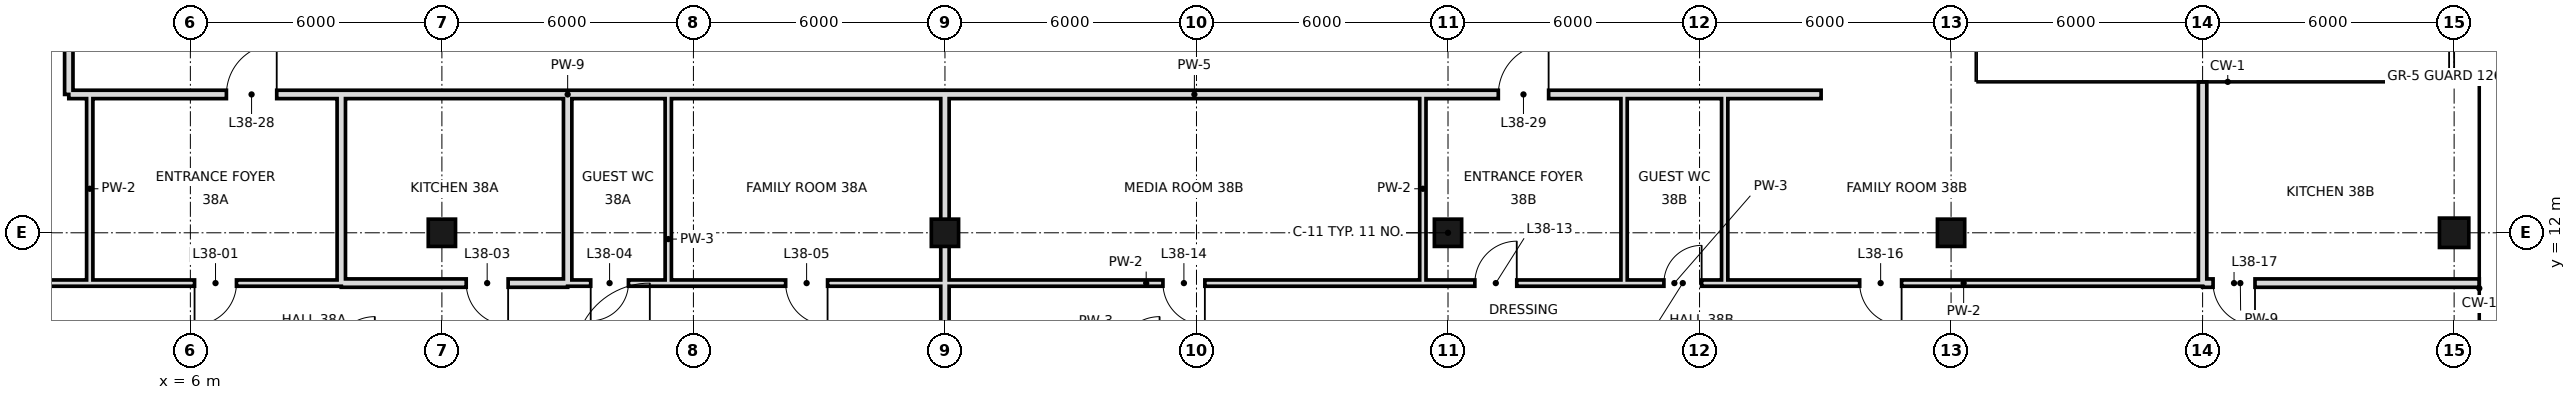
"""IFC4 building model, lengths in metres.
Left out: names, types, materials, properties, quantities, classifications, styles, units other than length and angle.
Written with IfcOpenShell. Run it as: python <this file> out.ifc"""

import sys

from ifc_helpers import new_model, si_unit, direction, frame, frame_2d, origin, origin_2d, place, context, subcontext, project, spatial, rectangle, hollow_rectangle, extrude, element, fill, save


model = new_model("IFC4")
c1 = context("Model", 3, precision=1e-05, world=origin(), true_north=direction((0.0, 1.0)))
c2 = subcontext(c1, "Body", "Model", "MODEL_VIEW")
j1 = project(units=[si_unit("LENGTHUNIT", "METRE"), si_unit("PLANEANGLEUNIT", "RADIAN")], contexts=[c1])
p1 = place(None, origin())
s1 = spatial("IfcSite", under=j1, at=p1, CompositionType="ELEMENT")
p2 = place(p1, origin())
s2 = spatial("IfcBuilding", under=s1, at=p2, CompositionType="ELEMENT")
p3 = place(p2, frame((0.0, 0.0, 167.2)))
s3 = spatial("IfcBuildingStorey", under=s2, at=p3, CompositionType="ELEMENT", Elevation=167.2)
for number, where, z_axis, x_axis in (
    (1, (12.0, 12.0, 0.0), (0.0, 0.0, 1.0), (1.0, 0.0, 0.0)),
    (2, (24.0, 12.0, 0.0), (0.0, 0.0, 1.0), (1.0, 0.0, 0.0)),
    (3, (36.0, 12.0, 0.0), (0.0, 0.0, 1.0), (1.0, 0.0, 0.0)),
    (4, (48.0, 12.0, 0.0), (0.0, 0.0, 1.0), (1.0, 0.0, 0.0)),
):
    element("IfcColumn", number, at=place(p3, frame(where, z_axis=z_axis, x_axis=x_axis)), inside=s3, PredefinedType="COLUMN", context=c2, shape_type="SweptSolid", body=[
        extrude(hollow_rectangle(XDim=0.65, YDim=0.65, WallThickness=0.032, at=origin_2d()), origin(), (0.0, 0.0, 1.0), 3.6),
    ])
p4 = place(p3, frame((60.0, 12.0, 0.0), z_axis=(0.0, 0.0, 1.0), x_axis=(1.0, 0.0, 0.0)))
e5 = element("IfcColumn", 5, at=p4, inside=s3, PredefinedType="COLUMN", context=c2, shape_type="SweptSolid", body=[
    extrude(hollow_rectangle(XDim=0.7, YDim=0.7, WallThickness=0.036, at=origin_2d()), origin(), (0.0, 0.0, 1.0), 3.6),
])
p5 = place(p3, frame((15.0, 10.8, 0.0), z_axis=(0.0, 0.0, 1.0), x_axis=(0.0, 1.0, 0.0)))
e6 = element("IfcWall", 6, at=p5, inside=s3, PredefinedType="SOLIDWALL", context=c2, shape_type="SweptSolid", body=[
    extrude(rectangle(XDim=4.5, YDim=0.2, at=frame_2d((2.25, 0.0))), origin(), (0.0, 0.0, 1.0), 2.72),
])
p6 = place(p3, frame((17.4, 10.8, 0.0), z_axis=(0.0, 0.0, 1.0), x_axis=(0.0, 1.0, 0.0)))
e7 = element("IfcWall", 7, at=p6, inside=s3, PredefinedType="PARTITIONING", context=c2, shape_type="SweptSolid", body=[
    extrude(rectangle(XDim=4.5, YDim=0.15, at=frame_2d((2.25, 0.0))), origin(), (0.0, 0.0, 1.0), 3.42),
])
p7 = place(p3, frame((24.0, 0.0, 0.0), z_axis=(0.0, 0.0, 1.0), x_axis=(0.0, 1.0, 0.0)))
e8 = element("IfcWall", 8, at=p7, inside=s3, PredefinedType="SOLIDWALL", context=c2, shape_type="SweptSolid", body=[
    extrude(rectangle(XDim=15.3, YDim=0.2, at=frame_2d((7.65, 0.0))), origin(), (0.0, 0.0, 1.0), 2.72),
])
p8 = place(p3, frame((3.1, 15.3, 0.0), z_axis=(0.0, 0.0, 1.0), x_axis=(0.0, 1.0, 0.0)))
e9 = element("IfcWall", 9, at=p8, inside=s3, PredefinedType="SOLIDWALL", context=c2, shape_type="SweptSolid", body=[
    extrude(rectangle(XDim=33.3, YDim=0.2, at=frame_2d((16.65, 0.0))), origin(), (0.0, 0.0, 1.0), 2.72),
])
p9 = place(p8, frame((22.76, 0.0, 0.0)))
e10 = element("IfcOpeningElement", 10, at=p9, cuts=e9, PredefinedType="OPENING", context=c2, shape_type="SweptSolid", body=[
    extrude(rectangle(XDim=1.2, YDim=2.4, at=frame_2d((0.6, 1.2))), frame((0.0, 0.11, 0.0), z_axis=(0.0, -1.0, 0.0), x_axis=(1.0, 0.0, 0.0)), (0.0, 0.0, 1.0), 0.22),
])
for number, where, z_axis, x_axis in (
    (11, (3.6, 10.8, 0.0), (0.0, 0.0, 1.0), (0.0, 1.0, 0.0)),
    (12, (35.4, 10.8, 0.0), (0.0, 0.0, 1.0), (0.0, 1.0, 0.0)),
    (13, (40.2, 10.8, 0.0), (0.0, 0.0, 1.0), (0.0, 1.0, 0.0)),
    (14, (42.6, 10.8, 0.0), (0.0, 0.0, 1.0), (0.0, 1.0, 0.0)),
):
    element("IfcWall", number, at=place(p3, frame(where, z_axis=z_axis, x_axis=x_axis)), inside=s3, PredefinedType="PARTITIONING", context=c2, shape_type="SweptSolid", body=[
        extrude(rectangle(XDim=4.5, YDim=0.15, at=frame_2d((2.25, 0.0))), origin(), (0.0, 0.0, 1.0), 3.42),
    ])
p10 = place(p3, frame((54.0, 10.8, 0.0), z_axis=(0.0, 0.0, 1.0), x_axis=(0.0, 1.0, 0.0)))
e15 = element("IfcWall", 15, at=p10, inside=s3, PredefinedType="SOLIDWALL", context=c2, shape_type="SweptSolid", body=[
    extrude(rectangle(XDim=4.8, YDim=0.2, at=frame_2d((2.4, 0.0))), origin(), (0.0, 0.0, 1.0), 2.72),
])
p11 = place(p3, frame((9.6, 10.8, 0.0), z_axis=(0.0, 0.0, 1.0), x_axis=(0.0, 1.0, 0.0)))
e16 = element("IfcWall", 16, at=p11, inside=s3, PredefinedType="SOLIDWALL", context=c2, shape_type="SweptSolid", body=[
    extrude(rectangle(XDim=4.5, YDim=0.2, at=frame_2d((2.25, 0.0))), origin(), (0.0, 0.0, 1.0), 2.72),
])
p12 = place(p3, frame((9.6, 10.8, 0.0), z_axis=(0.0, 0.0, 1.0), x_axis=(1.0, 0.0, 0.0)))
e17 = element("IfcWall", 17, at=p12, inside=s3, PredefinedType="SOLIDWALL", context=c2, shape_type="SweptSolid", body=[
    extrude(rectangle(XDim=5.4, YDim=0.2, at=frame_2d((2.7, 0.0))), origin(), (0.0, 0.0, 1.0), 2.72),
])
p13 = place(p12, frame((2.98, 0.0, 0.0)))
e18 = element("IfcOpeningElement", 18, at=p13, cuts=e17, PredefinedType="OPENING", context=c2, shape_type="SweptSolid", body=[
    extrude(rectangle(XDim=1.0, YDim=2.4, at=frame_2d((0.5, 1.2))), frame((0.0, 0.11, 0.0), z_axis=(0.0, -1.0, 0.0), x_axis=(1.0, 0.0, 0.0)), (0.0, 0.0, 1.0), 0.22),
])
p14 = place(p3, frame((54.0, 10.8, 0.0), z_axis=(0.0, 0.0, 1.0), x_axis=(1.0, 0.0, 0.0)))
e19 = element("IfcWall", 19, at=p14, inside=s3, PredefinedType="SOLIDWALL", context=c2, shape_type="SweptSolid", body=[
    extrude(rectangle(XDim=6.6, YDim=0.2, at=frame_2d((3.3, 0.0))), origin(), (0.0, 0.0, 1.0), 2.97),
])
p15 = place(p14, frame((0.25, 0.0, 0.0)))
e20 = element("IfcOpeningElement", 20, at=p15, cuts=e19, PredefinedType="OPENING", context=c2, shape_type="SweptSolid", body=[
    extrude(rectangle(XDim=1.0, YDim=2.4, at=frame_2d((0.5, 1.2))), frame((0.0, 0.11, 0.0), z_axis=(0.0, -1.0, 0.0), x_axis=(1.0, 0.0, 0.0)), (0.0, 0.0, 1.0), 0.22),
])
p16 = place(p3, frame((-6.6, 10.8, 0.0), z_axis=(0.0, 0.0, 1.0), x_axis=(1.0, 0.0, 0.0)))
e21 = element("IfcWall", 21, at=p16, inside=s3, PredefinedType="PARTITIONING", context=c2, shape_type="SweptSolid", body=[
    extrude(rectangle(XDim=16.2, YDim=0.15, at=frame_2d((8.1, 0.0))), origin(), (0.0, 0.0, 1.0), 3.42),
])
p17 = place(p16, frame((12.7, 0.0, 0.0)))
e22 = element("IfcOpeningElement", 22, at=p17, cuts=e21, PredefinedType="OPENING", context=c2, shape_type="SweptSolid", body=[
    extrude(rectangle(XDim=1.0, YDim=2.4, at=frame_2d((0.5, 1.2))), frame((0.0, 0.085, 0.0), z_axis=(0.0, -1.0, 0.0), x_axis=(1.0, 0.0, 0.0)), (0.0, 0.0, 1.0), 0.17),
])
p18 = place(p16, frame((3.28, 0.0, 0.0)))
e23 = element("IfcOpeningElement", 23, at=p18, cuts=e21, PredefinedType="OPENING", context=c2, shape_type="SweptSolid", body=[
    extrude(rectangle(XDim=1.0, YDim=2.4, at=frame_2d((0.5, 1.2))), frame((0.0, 0.085, 0.0), z_axis=(0.0, -1.0, 0.0), x_axis=(1.0, 0.0, 0.0)), (0.0, 0.0, 1.0), 0.17),
])
p19 = place(p3, frame((17.4, 10.8, 0.0), z_axis=(0.0, 0.0, 1.0), x_axis=(1.0, 0.0, 0.0)))
e24 = element("IfcWall", 24, at=p19, inside=s3, PredefinedType="PARTITIONING", context=c2, shape_type="SweptSolid", body=[
    extrude(rectangle(XDim=22.8, YDim=0.15, at=frame_2d((11.4, 0.0))), origin(), (0.0, 0.0, 1.0), 3.42),
])
p20 = place(p19, frame((2.8, 0.0, 0.0)))
e25 = element("IfcOpeningElement", 25, at=p20, cuts=e24, PredefinedType="OPENING", context=c2, shape_type="SweptSolid", body=[
    extrude(rectangle(XDim=1.0, YDim=2.4, at=frame_2d((0.5, 1.2))), frame((0.0, 0.085, 0.0), z_axis=(0.0, -1.0, 0.0), x_axis=(1.0, 0.0, 0.0)), (0.0, 0.0, 1.0), 0.17),
])
p21 = place(p19, frame((19.24, 0.0, 0.0)))
e26 = element("IfcOpeningElement", 26, at=p21, cuts=e24, PredefinedType="OPENING", context=c2, shape_type="SweptSolid", body=[
    extrude(rectangle(XDim=1.0, YDim=2.4, at=frame_2d((0.5, 1.2))), frame((0.0, 0.085, 0.0), z_axis=(0.0, -1.0, 0.0), x_axis=(1.0, 0.0, 0.0)), (0.0, 0.0, 1.0), 0.17),
])
p22 = place(p19, frame((11.8, 0.0, 0.0)))
e27 = element("IfcOpeningElement", 27, at=p22, cuts=e24, PredefinedType="OPENING", context=c2, shape_type="SweptSolid", body=[
    extrude(rectangle(XDim=1.0, YDim=2.4, at=frame_2d((0.5, 1.2))), frame((0.0, 0.085, 0.0), z_axis=(0.0, -1.0, 0.0), x_axis=(1.0, 0.0, 0.0)), (0.0, 0.0, 1.0), 0.17),
])
p23 = place(p3, frame((42.6, 10.8, 0.0), z_axis=(0.0, 0.0, 1.0), x_axis=(1.0, 0.0, 0.0)))
e28 = element("IfcWall", 28, at=p23, inside=s3, PredefinedType="PARTITIONING", context=c2, shape_type="SweptSolid", body=[
    extrude(rectangle(XDim=11.4, YDim=0.15, at=frame_2d((5.7, 0.0))), origin(), (0.0, 0.0, 1.0), 3.42),
])
p24 = place(p23, frame((3.22, 0.0, 0.0)))
e29 = element("IfcOpeningElement", 29, at=p24, cuts=e28, PredefinedType="OPENING", context=c2, shape_type="SweptSolid", body=[
    extrude(rectangle(XDim=1.0, YDim=2.4, at=frame_2d((0.5, 1.2))), frame((0.0, 0.085, 0.0), z_axis=(0.0, -1.0, 0.0), x_axis=(1.0, 0.0, 0.0)), (0.0, 0.0, 1.0), 0.17),
])
p25 = place(p3, frame((15.0, 10.8, 0.0), z_axis=(0.0, 0.0, 1.0), x_axis=(1.0, 0.0, 0.0)))
e30 = element("IfcWall", 30, at=p25, inside=s3, PredefinedType="PARTITIONING", context=c2, shape_type="SweptSolid", body=[
    extrude(rectangle(XDim=2.4, YDim=0.15, at=frame_2d((1.2, 0.0))), origin(), (0.0, 0.0, 1.0), 3.42),
])
p26 = place(p25, frame((0.55, 0.0, 0.0)))
e31 = element("IfcOpeningElement", 31, at=p26, cuts=e30, PredefinedType="OPENING", context=c2, shape_type="SweptSolid", body=[
    extrude(rectangle(XDim=0.9, YDim=2.4, at=frame_2d((0.45, 1.2))), frame((0.0, 0.085, 0.0), z_axis=(0.0, -1.0, 0.0), x_axis=(1.0, 0.0, 0.0)), (0.0, 0.0, 1.0), 0.17),
])
p27 = place(p3, frame((40.2, 10.8, 0.0), z_axis=(0.0, 0.0, 1.0), x_axis=(1.0, 0.0, 0.0)))
e32 = element("IfcWall", 32, at=p27, inside=s3, PredefinedType="PARTITIONING", context=c2, shape_type="SweptSolid", body=[
    extrude(rectangle(XDim=2.4, YDim=0.15, at=frame_2d((1.2, 0.0))), origin(), (0.0, 0.0, 1.0), 3.42),
])
p28 = place(p27, frame((0.95, 0.0, 0.0)))
e33 = element("IfcOpeningElement", 33, at=p28, cuts=e32, PredefinedType="OPENING", context=c2, shape_type="SweptSolid", body=[
    extrude(rectangle(XDim=0.9, YDim=2.4, at=frame_2d((0.45, 1.2))), frame((0.0, 0.085, 0.0), z_axis=(0.0, -1.0, 0.0), x_axis=(1.0, 0.0, 0.0)), (0.0, 0.0, 1.0), 0.17),
])
p29 = place(p3, frame((3.1, 15.3, 0.0), z_axis=(0.0, 0.0, 1.0), x_axis=(1.0, 0.0, 0.0)))
e34 = element("IfcWall", 34, at=p29, inside=s3, PredefinedType="SOLIDWALL", context=c2, shape_type="SweptSolid", body=[
    extrude(rectangle(XDim=6.5, YDim=0.2, at=frame_2d((3.25, 0.0))), origin(), (0.0, 0.0, 1.0), 2.72),
])
p30 = place(p29, frame((3.76, 0.0, 0.0)))
e35 = element("IfcOpeningElement", 35, at=p30, cuts=e34, PredefinedType="OPENING", context=c2, shape_type="SweptSolid", body=[
    extrude(rectangle(XDim=1.2, YDim=2.4, at=frame_2d((0.6, 1.2))), frame((0.0, 0.11, 0.0), z_axis=(0.0, -1.0, 0.0), x_axis=(1.0, 0.0, 0.0)), (0.0, 0.0, 1.0), 0.22),
])
p31 = place(p3, frame((15.0, 15.3, 0.0), z_axis=(0.0, 0.0, 1.0), x_axis=(1.0, 0.0, 0.0)))
e36 = element("IfcWall", 36, at=p31, inside=s3, PredefinedType="SOLIDWALL", context=c2, shape_type="SweptSolid", body=[
    extrude(rectangle(XDim=29.9, YDim=0.2, at=frame_2d((14.95, 0.0))), origin(), (0.0, 0.0, 1.0), 2.72),
])
p32 = place(p31, frame((22.2, 0.0, 0.0)))
e37 = element("IfcOpeningElement", 37, at=p32, cuts=e36, PredefinedType="OPENING", context=c2, shape_type="SweptSolid", body=[
    extrude(rectangle(XDim=1.2, YDim=2.4, at=frame_2d((0.6, 1.2))), frame((0.0, 0.11, 0.0), z_axis=(0.0, -1.0, 0.0), x_axis=(1.0, 0.0, 0.0)), (0.0, 0.0, 1.0), 0.22),
])
p33 = place(p3, frame((9.6, 15.3, 0.0), z_axis=(0.0, 0.0, 1.0), x_axis=(1.0, 0.0, 0.0)))
e38 = element("IfcWall", 38, at=p33, inside=s3, PredefinedType="SOLIDWALL", context=c2, shape_type="SweptSolid", body=[
    extrude(rectangle(XDim=5.4, YDim=0.2, at=frame_2d((2.7, 0.0))), origin(), (0.0, 0.0, 1.0), 3.42),
])
p34 = place(p17, frame((1.0, 0.0, 0.0), z_axis=(0.0, 0.0, 1.0), x_axis=(-1.0, 0.0, 0.0)))
e39 = element("IfcDoor", 39, at=p34, inside=s3, OperationType="SINGLE_SWING_RIGHT", PredefinedType="DOOR", context=c2, shape_type="SweptSolid", body=[
    extrude(rectangle(XDim=1.0, YDim=2.4, at=frame_2d((0.5, 1.2))), frame((0.0, 0.025, 0.0), z_axis=(0.0, -1.0, 0.0), x_axis=(1.0, 0.0, 0.0)), (0.0, 0.0, 1.0), 0.05),
])
fill(e22, e39)
p35 = place(p13, origin())
e40 = element("IfcDoor", 40, at=p35, inside=s3, OperationType="SINGLE_SWING_RIGHT", PredefinedType="DOOR", context=c2, shape_type="SweptSolid", body=[
    extrude(rectangle(XDim=1.0, YDim=2.4, at=frame_2d((0.5, 1.2))), frame((0.0, 0.025, 0.0), z_axis=(0.0, -1.0, 0.0), x_axis=(1.0, 0.0, 0.0)), (0.0, 0.0, 1.0), 0.05),
])
fill(e18, e40)
p36 = place(p26, frame((0.9, 0.0, 0.0), z_axis=(0.0, 0.0, 1.0), x_axis=(-1.0, 0.0, 0.0)))
e41 = element("IfcDoor", 41, at=p36, inside=s3, OperationType="SINGLE_SWING_RIGHT", PredefinedType="DOOR", context=c2, shape_type="SweptSolid", body=[
    extrude(rectangle(XDim=0.9, YDim=2.4, at=frame_2d((0.45, 1.2))), frame((0.0, 0.025, 0.0), z_axis=(0.0, -1.0, 0.0), x_axis=(1.0, 0.0, 0.0)), (0.0, 0.0, 1.0), 0.05),
])
fill(e31, e41)
p37 = place(p20, origin())
e42 = element("IfcDoor", 42, at=p37, inside=s3, OperationType="SINGLE_SWING_RIGHT", PredefinedType="DOOR", context=c2, shape_type="SweptSolid", body=[
    extrude(rectangle(XDim=1.0, YDim=2.4, at=frame_2d((0.5, 1.2))), frame((0.0, 0.025, 0.0), z_axis=(0.0, -1.0, 0.0), x_axis=(1.0, 0.0, 0.0)), (0.0, 0.0, 1.0), 0.05),
])
fill(e25, e42)
p38 = place(p21, frame((1.0, 0.0, 0.0), z_axis=(0.0, 0.0, 1.0), x_axis=(-1.0, 0.0, 0.0)))
e43 = element("IfcDoor", 43, at=p38, inside=s3, OperationType="SINGLE_SWING_LEFT", PredefinedType="DOOR", context=c2, shape_type="SweptSolid", body=[
    extrude(rectangle(XDim=1.0, YDim=2.4, at=frame_2d((0.5, 1.2))), frame((0.0, 0.025, 0.0), z_axis=(0.0, -1.0, 0.0), x_axis=(1.0, 0.0, 0.0)), (0.0, 0.0, 1.0), 0.05),
])
fill(e26, e43)
p39 = place(p22, origin())
e44 = element("IfcDoor", 44, at=p39, inside=s3, OperationType="SINGLE_SWING_RIGHT", PredefinedType="DOOR", context=c2, shape_type="SweptSolid", body=[
    extrude(rectangle(XDim=1.0, YDim=2.4, at=frame_2d((0.5, 1.2))), frame((0.0, 0.025, 0.0), z_axis=(0.0, -1.0, 0.0), x_axis=(1.0, 0.0, 0.0)), (0.0, 0.0, 1.0), 0.05),
])
fill(e27, e44)
p40 = place(p28, frame((0.9, 0.0, 0.0), z_axis=(0.0, 0.0, 1.0), x_axis=(-1.0, 0.0, 0.0)))
e45 = element("IfcDoor", 45, at=p40, inside=s3, OperationType="SINGLE_SWING_LEFT", PredefinedType="DOOR", context=c2, shape_type="SweptSolid", body=[
    extrude(rectangle(XDim=0.9, YDim=2.4, at=frame_2d((0.45, 1.2))), frame((0.0, 0.025, 0.0), z_axis=(0.0, -1.0, 0.0), x_axis=(1.0, 0.0, 0.0)), (0.0, 0.0, 1.0), 0.05),
])
fill(e33, e45)
p41 = place(p24, origin())
e46 = element("IfcDoor", 46, at=p41, inside=s3, OperationType="SINGLE_SWING_RIGHT", PredefinedType="DOOR", context=c2, shape_type="SweptSolid", body=[
    extrude(rectangle(XDim=1.0, YDim=2.4, at=frame_2d((0.5, 1.2))), frame((0.0, 0.025, 0.0), z_axis=(0.0, -1.0, 0.0), x_axis=(1.0, 0.0, 0.0)), (0.0, 0.0, 1.0), 0.05),
])
fill(e29, e46)
p42 = place(p15, origin())
e47 = element("IfcDoor", 47, at=p42, inside=s3, OperationType="SINGLE_SWING_RIGHT", PredefinedType="DOOR", context=c2, shape_type="SweptSolid", body=[
    extrude(rectangle(XDim=1.0, YDim=2.4, at=frame_2d((0.5, 1.2))), frame((0.0, 0.025, 0.0), z_axis=(0.0, -1.0, 0.0), x_axis=(1.0, 0.0, 0.0)), (0.0, 0.0, 1.0), 0.05),
])
fill(e20, e47)
p43 = place(p30, frame((1.2, 0.0, 0.0), z_axis=(0.0, 0.0, 1.0), x_axis=(-1.0, 0.0, 0.0)))
e48 = element("IfcDoor", 48, at=p43, inside=s3, OperationType="SINGLE_SWING_LEFT", PredefinedType="DOOR", context=c2, shape_type="SweptSolid", body=[
    extrude(rectangle(XDim=1.2, YDim=2.4, at=frame_2d((0.6, 1.2))), frame((0.0, 0.025, 0.0), z_axis=(0.0, -1.0, 0.0), x_axis=(1.0, 0.0, 0.0)), (0.0, 0.0, 1.0), 0.05),
])
fill(e35, e48)
p44 = place(p32, frame((1.2, 0.0, 0.0), z_axis=(0.0, 0.0, 1.0), x_axis=(-1.0, 0.0, 0.0)))
e49 = element("IfcDoor", 49, at=p44, inside=s3, OperationType="SINGLE_SWING_LEFT", PredefinedType="DOOR", context=c2, shape_type="SweptSolid", body=[
    extrude(rectangle(XDim=1.2, YDim=2.4, at=frame_2d((0.6, 1.2))), frame((0.0, 0.025, 0.0), z_axis=(0.0, -1.0, 0.0), x_axis=(1.0, 0.0, 0.0)), (0.0, 0.0, 1.0), 0.05),
])
fill(e37, e49)
save(model, sys.argv[1])
